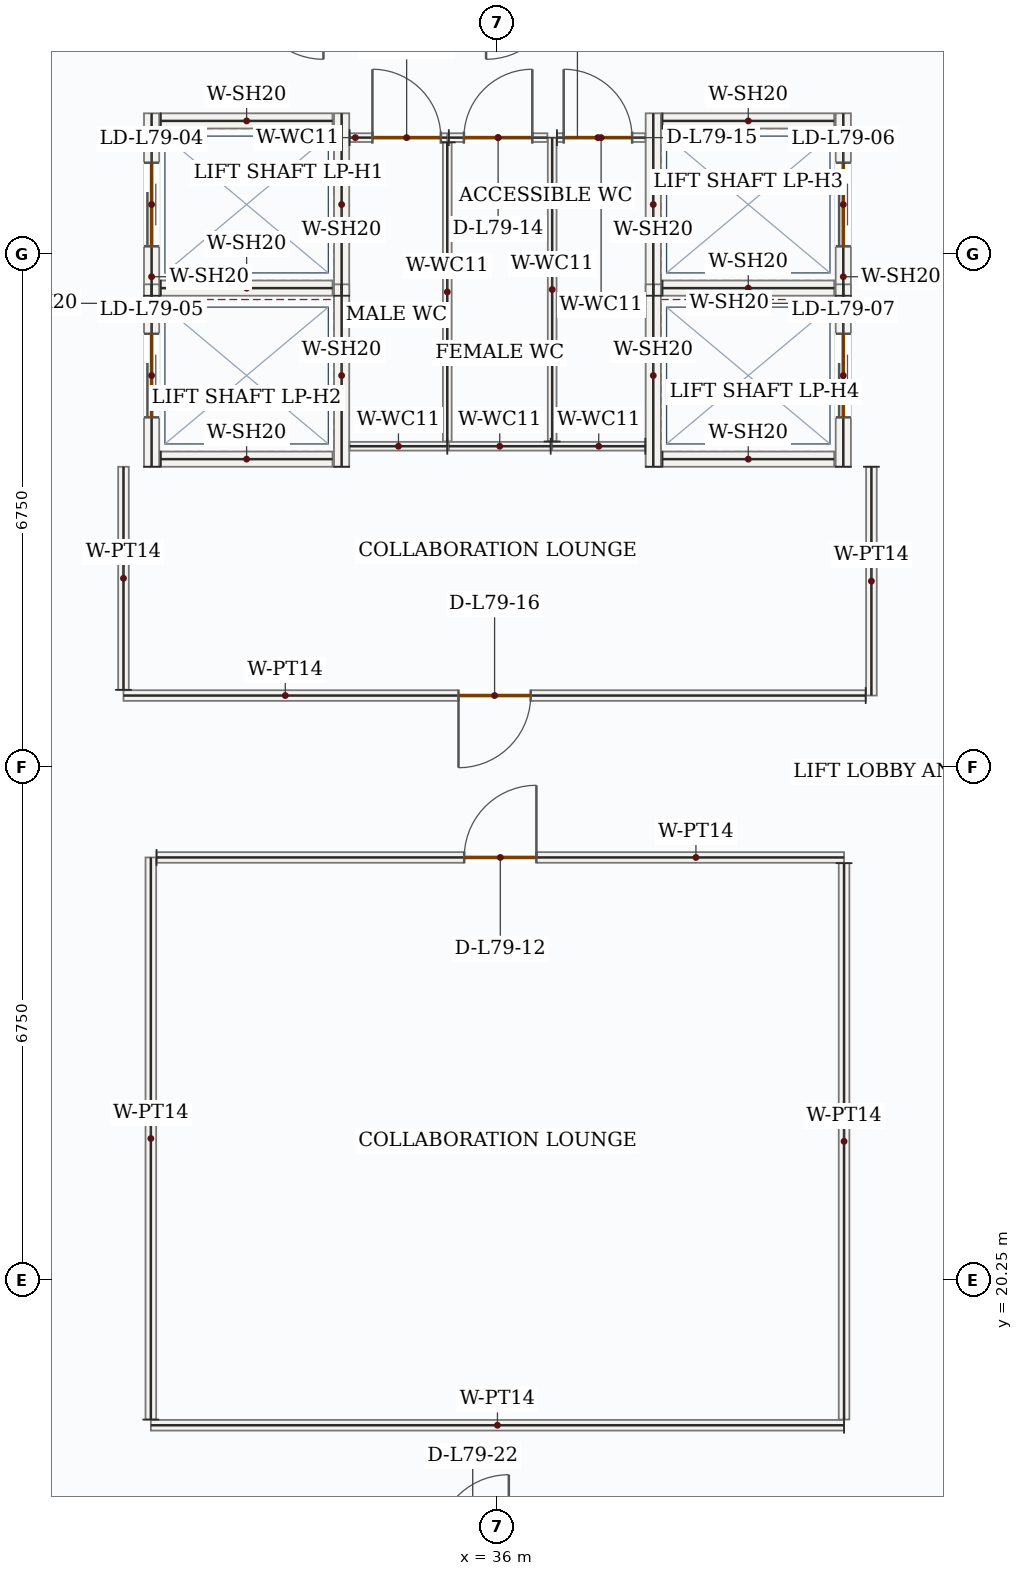
"""IFC4 building model, lengths in metres.
Left out: names, types, materials, properties, quantities, classifications, styles, units other than length and angle.
Written with IfcOpenShell. Run it as: python <this file> out.ifc"""

import sys

from ifc_helpers import new_model, si_unit, direction, frame, frame_2d, origin, place, context, subcontext, project, spatial, rectangle, extrude, source, transform, mapped, element, fill, save


model = new_model("IFC4")
c1 = context("Model", 3, precision=1e-05, world=origin(), true_north=direction((0.0, 1.0)))
c2 = subcontext(c1, "Body", "Model", "MODEL_VIEW")
j1 = project(units=[si_unit("LENGTHUNIT", "METRE"), si_unit("PLANEANGLEUNIT", "RADIAN")], contexts=[c1])
p1 = place(None, origin())
s1 = spatial("IfcSite", under=j1, at=p1, CompositionType="ELEMENT")
p2 = place(p1, origin())
s2 = spatial("IfcBuilding", under=s1, at=p2, CompositionType="ELEMENT")
p3 = place(p2, frame((0.0, 0.0, 327.3)))
s3 = spatial("IfcBuildingStorey", under=s2, at=p3, CompositionType="ELEMENT", Elevation=327.3)
p4 = place(p3, frame((31.45, 33.2, 0.0), z_axis=(0.0, 0.0, 1.0), x_axis=(0.0, 1.0, 0.0)))
e1 = element("IfcWall", 1, at=p4, inside=s3, PredefinedType="SOLIDWALL", context=c2, shape_type="SweptSolid", body=[
    extrude(rectangle(XDim=2.4, YDim=0.2, at=frame_2d((1.2, 0.0))), origin(), (0.0, 0.0, 1.0), 3.5),
])
p5 = place(p4, frame((0.65, 0.0, 0.0)))
e2 = element("IfcOpeningElement", 2, at=p5, cuts=e1, PredefinedType="OPENING", context=c2, shape_type="SweptSolid", body=[
    extrude(rectangle(XDim=1.1, YDim=2.15, at=frame_2d((0.55, 1.075))), frame((0.0, 0.11, 0.0), z_axis=(0.0, -1.0, 0.0), x_axis=(1.0, 0.0, 0.0)), (0.0, 0.0, 1.0), 0.22),
])
m1 = source(origin(), c2, "Body", "SweptSolid", [
    extrude(rectangle(XDim=2.4, YDim=0.2, at=frame_2d((1.2, 0.0))), origin(), (0.0, 0.0, 1.0), 3.5),
])
p6 = place(p3, frame((33.95, 33.2, 0.0), z_axis=(0.0, 0.0, 1.0), x_axis=(0.0, 1.0, 0.0)))
e3 = element("IfcWall", 3, at=p6, inside=s3, PredefinedType="SOLIDWALL", context=c2, shape_type="MappedRepresentation", body=[
    mapped(m1, transform((0.0, 0.0, 0.0), x_axis=(1.0, 0.0, 0.0), y_axis=(0.0, 1.0, 0.0), z_axis=(0.0, 0.0, 1.0), scale=1.0)),
])
m2 = source(origin(), c2, "Body", "SweptSolid", [
    extrude(rectangle(XDim=2.26, YDim=0.2, at=frame_2d((1.13, 0.0))), origin(), (0.0, 0.0, 1.0), 3.5),
])
for number, where, z_axis, x_axis in (
    (4, (31.57, 33.3, 0.0), (0.0, 0.0, 1.0), (1.0, 0.0, 0.0)),
    (5, (31.57, 35.5, 0.0), (0.0, 0.0, 1.0), (1.0, 0.0, 0.0)),
):
    element("IfcWall", number, at=place(p3, frame(where, z_axis=z_axis, x_axis=x_axis)), inside=s3, PredefinedType="SOLIDWALL", context=c2, shape_type="MappedRepresentation", body=[
        mapped(m2, transform((0.0, 0.0, 0.0), x_axis=(1.0, 0.0, 0.0), y_axis=(0.0, 1.0, 0.0), z_axis=(0.0, 0.0, 1.0), scale=1.0)),
    ])
p7 = place(p3, frame((31.45, 30.95, 0.0), z_axis=(0.0, 0.0, 1.0), x_axis=(0.0, 1.0, 0.0)))
e6 = element("IfcWall", 6, at=p7, inside=s3, PredefinedType="SOLIDWALL", context=c2, shape_type="SweptSolid", body=[
    extrude(rectangle(XDim=2.4, YDim=0.2, at=frame_2d((1.2, 0.0))), origin(), (0.0, 0.0, 1.0), 3.5),
])
p8 = place(p7, frame((0.65, 0.0, 0.0)))
e7 = element("IfcOpeningElement", 7, at=p8, cuts=e6, PredefinedType="OPENING", context=c2, shape_type="SweptSolid", body=[
    extrude(rectangle(XDim=1.1, YDim=2.15, at=frame_2d((0.55, 1.075))), frame((0.0, 0.11, 0.0), z_axis=(0.0, -1.0, 0.0), x_axis=(1.0, 0.0, 0.0)), (0.0, 0.0, 1.0), 0.22),
])
p9 = place(p3, frame((33.95, 30.95, 0.0), z_axis=(0.0, 0.0, 1.0), x_axis=(0.0, 1.0, 0.0)))
e8 = element("IfcWall", 8, at=p9, inside=s3, PredefinedType="SOLIDWALL", context=c2, shape_type="MappedRepresentation", body=[
    mapped(m1, transform((0.0, 0.0, 0.0), x_axis=(1.0, 0.0, 0.0), y_axis=(0.0, 1.0, 0.0), z_axis=(0.0, 0.0, 1.0), scale=1.0)),
])
p10 = place(p3, frame((31.57, 31.05, 0.0), z_axis=(0.0, 0.0, 1.0), x_axis=(1.0, 0.0, 0.0)))
e9 = element("IfcWall", 9, at=p10, inside=s3, PredefinedType="SOLIDWALL", context=c2, shape_type="MappedRepresentation", body=[
    mapped(m2, transform((0.0, 0.0, 0.0), x_axis=(1.0, 0.0, 0.0), y_axis=(0.0, 1.0, 0.0), z_axis=(0.0, 0.0, 1.0), scale=1.0)),
])
p11 = place(p3, frame((38.05, 33.2, 0.0), z_axis=(0.0, 0.0, 1.0), x_axis=(0.0, 1.0, 0.0)))
e10 = element("IfcWall", 10, at=p11, inside=s3, PredefinedType="SOLIDWALL", context=c2, shape_type="MappedRepresentation", body=[
    mapped(m1, transform((0.0, 0.0, 0.0), x_axis=(1.0, 0.0, 0.0), y_axis=(0.0, 1.0, 0.0), z_axis=(0.0, 0.0, 1.0), scale=1.0)),
])
p12 = place(p3, frame((40.55, 33.2, 0.0), z_axis=(0.0, 0.0, 1.0), x_axis=(0.0, 1.0, 0.0)))
e11 = element("IfcWall", 11, at=p12, inside=s3, PredefinedType="SOLIDWALL", context=c2, shape_type="SweptSolid", body=[
    extrude(rectangle(XDim=2.4, YDim=0.2, at=frame_2d((1.2, 0.0))), origin(), (0.0, 0.0, 1.0), 3.5),
])
p13 = place(p12, frame((0.65, 0.0, 0.0)))
e12 = element("IfcOpeningElement", 12, at=p13, cuts=e11, PredefinedType="OPENING", context=c2, shape_type="SweptSolid", body=[
    extrude(rectangle(XDim=1.1, YDim=2.15, at=frame_2d((0.55, 1.075))), frame((0.0, 0.11, 0.0), z_axis=(0.0, -1.0, 0.0), x_axis=(1.0, 0.0, 0.0)), (0.0, 0.0, 1.0), 0.22),
])
for number, where, z_axis, x_axis in (
    (13, (38.17, 33.3, 0.0), (0.0, 0.0, 1.0), (1.0, 0.0, 0.0)),
    (14, (38.17, 35.5, 0.0), (0.0, 0.0, 1.0), (1.0, 0.0, 0.0)),
):
    element("IfcWall", number, at=place(p3, frame(where, z_axis=z_axis, x_axis=x_axis)), inside=s3, PredefinedType="SOLIDWALL", context=c2, shape_type="MappedRepresentation", body=[
        mapped(m2, transform((0.0, 0.0, 0.0), x_axis=(1.0, 0.0, 0.0), y_axis=(0.0, 1.0, 0.0), z_axis=(0.0, 0.0, 1.0), scale=1.0)),
    ])
p14 = place(p3, frame((38.05, 30.95, 0.0), z_axis=(0.0, 0.0, 1.0), x_axis=(0.0, 1.0, 0.0)))
e15 = element("IfcWall", 15, at=p14, inside=s3, PredefinedType="SOLIDWALL", context=c2, shape_type="MappedRepresentation", body=[
    mapped(m1, transform((0.0, 0.0, 0.0), x_axis=(1.0, 0.0, 0.0), y_axis=(0.0, 1.0, 0.0), z_axis=(0.0, 0.0, 1.0), scale=1.0)),
])
p15 = place(p3, frame((40.55, 30.95, 0.0), z_axis=(0.0, 0.0, 1.0), x_axis=(0.0, 1.0, 0.0)))
e16 = element("IfcWall", 16, at=p15, inside=s3, PredefinedType="SOLIDWALL", context=c2, shape_type="SweptSolid", body=[
    extrude(rectangle(XDim=2.4, YDim=0.2, at=frame_2d((1.2, 0.0))), origin(), (0.0, 0.0, 1.0), 3.5),
])
p16 = place(p15, frame((0.65, 0.0, 0.0)))
e17 = element("IfcOpeningElement", 17, at=p16, cuts=e16, PredefinedType="OPENING", context=c2, shape_type="SweptSolid", body=[
    extrude(rectangle(XDim=1.1, YDim=2.15, at=frame_2d((0.55, 1.075))), frame((0.0, 0.11, 0.0), z_axis=(0.0, -1.0, 0.0), x_axis=(1.0, 0.0, 0.0)), (0.0, 0.0, 1.0), 0.22),
])
p17 = place(p3, frame((38.17, 31.05, 0.0), z_axis=(0.0, 0.0, 1.0), x_axis=(1.0, 0.0, 0.0)))
e18 = element("IfcWall", 18, at=p17, inside=s3, PredefinedType="SOLIDWALL", context=c2, shape_type="MappedRepresentation", body=[
    mapped(m2, transform((0.0, 0.0, 0.0), x_axis=(1.0, 0.0, 0.0), y_axis=(0.0, 1.0, 0.0), z_axis=(0.0, 0.0, 1.0), scale=1.0)),
])
m3 = source(origin(), c2, "Body", "SweptSolid", [
    extrude(rectangle(XDim=1.225, YDim=0.115, at=frame_2d((0.613, 0.0))), origin(), (0.0, 0.0, 1.0), 3.5),
])
p18 = place(p3, frame((37.945, 31.22, 0.0), z_axis=(0.0, 0.0, 1.0), x_axis=(-1.0, 0.0, 0.0)))
e19 = element("IfcWall", 19, at=p18, inside=s3, PredefinedType="PARTITIONING", context=c2, shape_type="MappedRepresentation", body=[
    mapped(m3, transform((0.0, 0.0, 0.0), x_axis=(1.0, 0.0, 0.0), y_axis=(0.0, 1.0, 0.0), z_axis=(0.0, 0.0, 1.0), scale=1.0)),
])
m4 = source(origin(), c2, "Body", "SweptSolid", [
    extrude(rectangle(XDim=3.998, YDim=0.115, at=frame_2d((1.999, 0.0))), origin(), (0.0, 0.0, 1.0), 3.5),
])
p19 = place(p3, frame((36.72, 31.282, 0.0), z_axis=(0.0, 0.0, 1.0), x_axis=(0.0, 1.0, 0.0)))
e20 = element("IfcWall", 20, at=p19, inside=s3, PredefinedType="PARTITIONING", context=c2, shape_type="MappedRepresentation", body=[
    mapped(m4, transform((0.0, 0.0, 0.0), x_axis=(1.0, 0.0, 0.0), y_axis=(0.0, 1.0, 0.0), z_axis=(0.0, 0.0, 1.0), scale=1.0)),
])
p20 = place(p3, frame((36.782, 35.28, 0.0), z_axis=(0.0, 0.0, 1.0), x_axis=(1.0, 0.0, 0.0)))
e21 = element("IfcWall", 21, at=p20, inside=s3, PredefinedType="PARTITIONING", context=c2, shape_type="SweptSolid", body=[
    extrude(rectangle(XDim=1.163, YDim=0.115, at=frame_2d((0.581, 0.0))), origin(), (0.0, 0.0, 1.0), 3.5),
])
p21 = place(p20, frame((0.089, 0.0, 0.0)))
e22 = element("IfcOpeningElement", 22, at=p21, cuts=e21, PredefinedType="OPENING", context=c2, shape_type="SweptSolid", body=[
    extrude(rectangle(XDim=0.9, YDim=2.1, at=frame_2d((0.45, 1.05))), frame((0.0, 0.067, 0.0), z_axis=(0.0, -1.0, 0.0), x_axis=(1.0, 0.0, 0.0)), (0.0, 0.0, 1.0), 0.135),
])
m5 = source(origin(), c2, "Body", "SweptSolid", [
    extrude(rectangle(XDim=1.285, YDim=0.115, at=frame_2d((0.643, 0.0))), origin(), (0.0, 0.0, 1.0), 3.5),
])
p22 = place(p3, frame((35.34, 31.22, 0.0), z_axis=(0.0, 0.0, 1.0), x_axis=(-1.0, 0.0, 0.0)))
e23 = element("IfcWall", 23, at=p22, inside=s3, PredefinedType="PARTITIONING", context=c2, shape_type="MappedRepresentation", body=[
    mapped(m5, transform((0.0, 0.0, 0.0), x_axis=(1.0, 0.0, 0.0), y_axis=(0.0, 1.0, 0.0), z_axis=(0.0, 0.0, 1.0), scale=1.0)),
])
p23 = place(p3, frame((34.055, 35.28, 0.0), z_axis=(0.0, 0.0, 1.0), x_axis=(1.0, 0.0, 0.0)))
e24 = element("IfcWall", 24, at=p23, inside=s3, PredefinedType="PARTITIONING", context=c2, shape_type="SweptSolid", body=[
    extrude(rectangle(XDim=1.285, YDim=0.115, at=frame_2d((0.643, 0.0))), origin(), (0.0, 0.0, 1.0), 3.5),
])
p24 = place(p23, frame((0.3, 0.0, 0.0)))
e25 = element("IfcOpeningElement", 25, at=p24, cuts=e24, PredefinedType="OPENING", context=c2, shape_type="SweptSolid", body=[
    extrude(rectangle(XDim=0.9, YDim=2.1, at=frame_2d((0.45, 1.05))), frame((0.0, 0.067, 0.0), z_axis=(0.0, -1.0, 0.0), x_axis=(1.0, 0.0, 0.0)), (0.0, 0.0, 1.0), 0.135),
])
m6 = source(origin(), c2, "Body", "SweptSolid", [
    extrude(rectangle(XDim=3.935, YDim=0.115, at=frame_2d((1.968, 0.0))), origin(), (0.0, 0.0, 1.0), 3.5),
])
p25 = place(p3, frame((35.34, 35.218, 0.0), z_axis=(0.0, 0.0, 1.0), x_axis=(0.0, -1.0, 0.0)))
e26 = element("IfcWall", 26, at=p25, inside=s3, PredefinedType="PARTITIONING", context=c2, shape_type="MappedRepresentation", body=[
    mapped(m6, transform((0.0, 0.0, 0.0), x_axis=(1.0, 0.0, 0.0), y_axis=(0.0, 1.0, 0.0), z_axis=(0.0, 0.0, 1.0), scale=1.0)),
])
m7 = source(origin(), c2, "Body", "SweptSolid", [
    extrude(rectangle(XDim=1.34, YDim=0.115, at=frame_2d((0.67, 0.0))), origin(), (0.0, 0.0, 1.0), 3.5),
])
p26 = place(p3, frame((36.7, 31.22, 0.0), z_axis=(0.0, 0.0, 1.0), x_axis=(-1.0, 0.0, 0.0)))
e27 = element("IfcWall", 27, at=p26, inside=s3, PredefinedType="PARTITIONING", context=c2, shape_type="MappedRepresentation", body=[
    mapped(m7, transform((0.0, 0.0, 0.0), x_axis=(1.0, 0.0, 0.0), y_axis=(0.0, 1.0, 0.0), z_axis=(0.0, 0.0, 1.0), scale=1.0)),
])
p27 = place(p3, frame((35.36, 35.28, 0.0), z_axis=(0.0, 0.0, 1.0), x_axis=(1.0, 0.0, 0.0)))
e28 = element("IfcWall", 28, at=p27, inside=s3, PredefinedType="PARTITIONING", context=c2, shape_type="SweptSolid", body=[
    extrude(rectangle(XDim=1.297, YDim=0.115, at=frame_2d((0.649, 0.0))), origin(), (0.0, 0.0, 1.0), 3.5),
])
p28 = place(p27, frame((0.199, 0.0, 0.0)))
e29 = element("IfcOpeningElement", 29, at=p28, cuts=e28, PredefinedType="OPENING", context=c2, shape_type="SweptSolid", body=[
    extrude(rectangle(XDim=0.9, YDim=2.1, at=frame_2d((0.45, 1.05))), frame((0.0, 0.067, 0.0), z_axis=(0.0, -1.0, 0.0), x_axis=(1.0, 0.0, 0.0)), (0.0, 0.0, 1.0), 0.135),
])
m8 = source(origin(), c2, "Body", "SweptSolid", [
    extrude(rectangle(XDim=3.01, YDim=0.14, at=frame_2d((1.505, 0.0))), origin(), (0.0, 0.0, 1.0), 3.5),
])
p29 = place(p3, frame((40.92, 30.95, 0.0), z_axis=(0.0, 0.0, 1.0), x_axis=(0.0, -1.0, 0.0)))
e30 = element("IfcWall", 30, at=p29, inside=s3, PredefinedType="PARTITIONING", context=c2, shape_type="MappedRepresentation", body=[
    mapped(m8, transform((0.0, 0.0, 0.0), x_axis=(1.0, 0.0, 0.0), y_axis=(0.0, 1.0, 0.0), z_axis=(0.0, 0.0, 1.0), scale=1.0)),
])
p30 = place(p3, frame((40.845, 27.94, 0.0), z_axis=(0.0, 0.0, 1.0), x_axis=(-1.0, 0.0, 0.0)))
e31 = element("IfcWall", 31, at=p30, inside=s3, PredefinedType="PARTITIONING", context=c2, shape_type="SweptSolid", body=[
    extrude(rectangle(XDim=9.765, YDim=0.14, at=frame_2d((4.882, 0.0))), origin(), (0.0, 0.0, 1.0), 3.5),
])
p31 = place(p30, frame((4.407, 0.0, 0.0)))
e32 = element("IfcOpeningElement", 32, at=p31, cuts=e31, PredefinedType="OPENING", context=c2, shape_type="SweptSolid", body=[
    extrude(rectangle(XDim=0.95, YDim=2.15, at=frame_2d((0.475, 1.075))), frame((0.0, 0.08, 0.0), z_axis=(0.0, -1.0, 0.0), x_axis=(1.0, 0.0, 0.0)), (0.0, 0.0, 1.0), 0.16),
])
m9 = source(origin(), c2, "Body", "SweptSolid", [
    extrude(rectangle(XDim=2.935, YDim=0.14, at=frame_2d((1.468, 0.0))), origin(), (0.0, 0.0, 1.0), 3.5),
])
p32 = place(p3, frame((31.08, 28.015, 0.0), z_axis=(0.0, 0.0, 1.0), x_axis=(0.0, 1.0, 0.0)))
e33 = element("IfcWall", 33, at=p32, inside=s3, PredefinedType="PARTITIONING", context=c2, shape_type="MappedRepresentation", body=[
    mapped(m9, transform((0.0, 0.0, 0.0), x_axis=(1.0, 0.0, 0.0), y_axis=(0.0, 1.0, 0.0), z_axis=(0.0, 0.0, 1.0), scale=1.0)),
])
m10 = source(origin(), c2, "Body", "SweptSolid", [
    extrude(rectangle(XDim=9.12, YDim=0.14, at=frame_2d((4.56, 0.0))), origin(), (0.0, 0.0, 1.0), 3.5),
])
p33 = place(p3, frame((40.56, 18.34, 0.0), z_axis=(0.0, 0.0, 1.0), x_axis=(-1.0, 0.0, 0.0)))
e34 = element("IfcWall", 34, at=p33, inside=s3, PredefinedType="PARTITIONING", context=c2, shape_type="MappedRepresentation", body=[
    mapped(m10, transform((0.0, 0.0, 0.0), x_axis=(1.0, 0.0, 0.0), y_axis=(0.0, 1.0, 0.0), z_axis=(0.0, 0.0, 1.0), scale=1.0)),
])
m11 = source(origin(), c2, "Body", "SweptSolid", [
    extrude(rectangle(XDim=7.395, YDim=0.14, at=frame_2d((3.698, 0.0))), origin(), (0.0, 0.0, 1.0), 3.5),
])
p34 = place(p3, frame((31.44, 18.415, 0.0), z_axis=(0.0, 0.0, 1.0), x_axis=(0.0, 1.0, 0.0)))
e35 = element("IfcWall", 35, at=p34, inside=s3, PredefinedType="PARTITIONING", context=c2, shape_type="MappedRepresentation", body=[
    mapped(m11, transform((0.0, 0.0, 0.0), x_axis=(1.0, 0.0, 0.0), y_axis=(0.0, 1.0, 0.0), z_axis=(0.0, 0.0, 1.0), scale=1.0)),
])
p35 = place(p3, frame((31.515, 25.81, 0.0), z_axis=(0.0, 0.0, 1.0), x_axis=(1.0, 0.0, 0.0)))
e36 = element("IfcWall", 36, at=p35, inside=s3, PredefinedType="PARTITIONING", context=c2, shape_type="SweptSolid", body=[
    extrude(rectangle(XDim=9.045, YDim=0.14, at=frame_2d((4.522, 0.0))), origin(), (0.0, 0.0, 1.0), 3.5),
])
p36 = place(p35, frame((4.048, 0.0, 0.0)))
e37 = element("IfcOpeningElement", 37, at=p36, cuts=e36, PredefinedType="OPENING", context=c2, shape_type="SweptSolid", body=[
    extrude(rectangle(XDim=0.95, YDim=2.15, at=frame_2d((0.475, 1.075))), frame((0.0, 0.08, 0.0), z_axis=(0.0, -1.0, 0.0), x_axis=(1.0, 0.0, 0.0)), (0.0, 0.0, 1.0), 0.16),
])
m12 = source(origin(), c2, "Body", "SweptSolid", [
    extrude(rectangle(XDim=7.32, YDim=0.14, at=frame_2d((3.66, 0.0))), origin(), (0.0, 0.0, 1.0), 3.5),
])
p37 = place(p3, frame((40.56, 25.735, 0.0), z_axis=(0.0, 0.0, 1.0), x_axis=(0.0, -1.0, 0.0)))
e38 = element("IfcWall", 38, at=p37, inside=s3, PredefinedType="PARTITIONING", context=c2, shape_type="MappedRepresentation", body=[
    mapped(m12, transform((0.0, 0.0, 0.0), x_axis=(1.0, 0.0, 0.0), y_axis=(0.0, 1.0, 0.0), z_axis=(0.0, 0.0, 1.0), scale=1.0)),
])
m13 = source(origin(), c2, "Body", "SweptSolid", [
    extrude(rectangle(XDim=1.1, YDim=2.15, at=frame_2d((0.55, 1.075))), frame((0.0, 0.025, 0.0), z_axis=(0.0, -1.0, 0.0), x_axis=(1.0, 0.0, 0.0)), (0.0, 0.0, 1.0), 0.05),
])
p38 = place(p5, origin())
e39 = element("IfcDoor", 39, at=p38, inside=s3, OperationType="DOUBLE_DOOR_SLIDING", PredefinedType="DOOR", context=c2, shape_type="MappedRepresentation", body=[
    mapped(m13, transform((0.0, 0.0, 0.0), x_axis=(1.0, 0.0, 0.0), y_axis=(0.0, 1.0, 0.0), z_axis=(0.0, 0.0, 1.0), scale=1.0)),
])
fill(e2, e39)
p39 = place(p8, origin())
e40 = element("IfcDoor", 40, at=p39, inside=s3, OperationType="DOUBLE_DOOR_SLIDING", PredefinedType="DOOR", context=c2, shape_type="MappedRepresentation", body=[
    mapped(m13, transform((0.0, 0.0, 0.0), x_axis=(1.0, 0.0, 0.0), y_axis=(0.0, 1.0, 0.0), z_axis=(0.0, 0.0, 1.0), scale=1.0)),
])
fill(e7, e40)
p40 = place(p13, origin())
e41 = element("IfcDoor", 41, at=p40, inside=s3, OperationType="DOUBLE_DOOR_SLIDING", PredefinedType="DOOR", context=c2, shape_type="MappedRepresentation", body=[
    mapped(m13, transform((0.0, 0.0, 0.0), x_axis=(1.0, 0.0, 0.0), y_axis=(0.0, 1.0, 0.0), z_axis=(0.0, 0.0, 1.0), scale=1.0)),
])
fill(e12, e41)
p41 = place(p16, origin())
e42 = element("IfcDoor", 42, at=p41, inside=s3, OperationType="DOUBLE_DOOR_SLIDING", PredefinedType="DOOR", context=c2, shape_type="MappedRepresentation", body=[
    mapped(m13, transform((0.0, 0.0, 0.0), x_axis=(1.0, 0.0, 0.0), y_axis=(0.0, 1.0, 0.0), z_axis=(0.0, 0.0, 1.0), scale=1.0)),
])
fill(e17, e42)
m14 = source(origin(), c2, "Body", "SweptSolid", [
    extrude(rectangle(XDim=0.95, YDim=2.15, at=frame_2d((0.475, 1.075))), frame((0.0, 0.025, 0.0), z_axis=(0.0, -1.0, 0.0), x_axis=(1.0, 0.0, 0.0)), (0.0, 0.0, 1.0), 0.05),
])
p42 = place(p36, origin())
e43 = element("IfcDoor", 43, at=p42, inside=s3, OperationType="SINGLE_SWING_RIGHT", PredefinedType="DOOR", context=c2, shape_type="MappedRepresentation", body=[
    mapped(m14, transform((0.0, 0.0, 0.0), x_axis=(1.0, 0.0, 0.0), y_axis=(0.0, 1.0, 0.0), z_axis=(0.0, 0.0, 1.0), scale=1.0)),
])
fill(e37, e43)
m15 = source(origin(), c2, "Body", "SweptSolid", [
    extrude(rectangle(XDim=0.9, YDim=2.1, at=frame_2d((0.45, 1.05))), frame((0.0, 0.025, 0.0), z_axis=(0.0, -1.0, 0.0), x_axis=(1.0, 0.0, 0.0)), (0.0, 0.0, 1.0), 0.05),
])
p43 = place(p24, origin())
e44 = element("IfcDoor", 44, at=p43, inside=s3, OperationType="SINGLE_SWING_LEFT", PredefinedType="DOOR", context=c2, shape_type="MappedRepresentation", body=[
    mapped(m15, transform((0.0, 0.0, 0.0), x_axis=(1.0, 0.0, 0.0), y_axis=(0.0, 1.0, 0.0), z_axis=(0.0, 0.0, 1.0), scale=1.0)),
])
fill(e25, e44)
p44 = place(p28, origin())
e45 = element("IfcDoor", 45, at=p44, inside=s3, OperationType="SINGLE_SWING_RIGHT", PredefinedType="DOOR", context=c2, shape_type="MappedRepresentation", body=[
    mapped(m15, transform((0.0, 0.0, 0.0), x_axis=(1.0, 0.0, 0.0), y_axis=(0.0, 1.0, 0.0), z_axis=(0.0, 0.0, 1.0), scale=1.0)),
])
fill(e29, e45)
p45 = place(p21, origin())
e46 = element("IfcDoor", 46, at=p45, inside=s3, OperationType="SINGLE_SWING_LEFT", PredefinedType="DOOR", context=c2, shape_type="MappedRepresentation", body=[
    mapped(m15, transform((0.0, 0.0, 0.0), x_axis=(1.0, 0.0, 0.0), y_axis=(0.0, 1.0, 0.0), z_axis=(0.0, 0.0, 1.0), scale=1.0)),
])
fill(e22, e46)
p46 = place(p31, origin())
e47 = element("IfcDoor", 47, at=p46, inside=s3, OperationType="SINGLE_SWING_RIGHT", PredefinedType="DOOR", context=c2, shape_type="MappedRepresentation", body=[
    mapped(m14, transform((0.0, 0.0, 0.0), x_axis=(1.0, 0.0, 0.0), y_axis=(0.0, 1.0, 0.0), z_axis=(0.0, 0.0, 1.0), scale=1.0)),
])
fill(e32, e47)
save(model, sys.argv[1])
